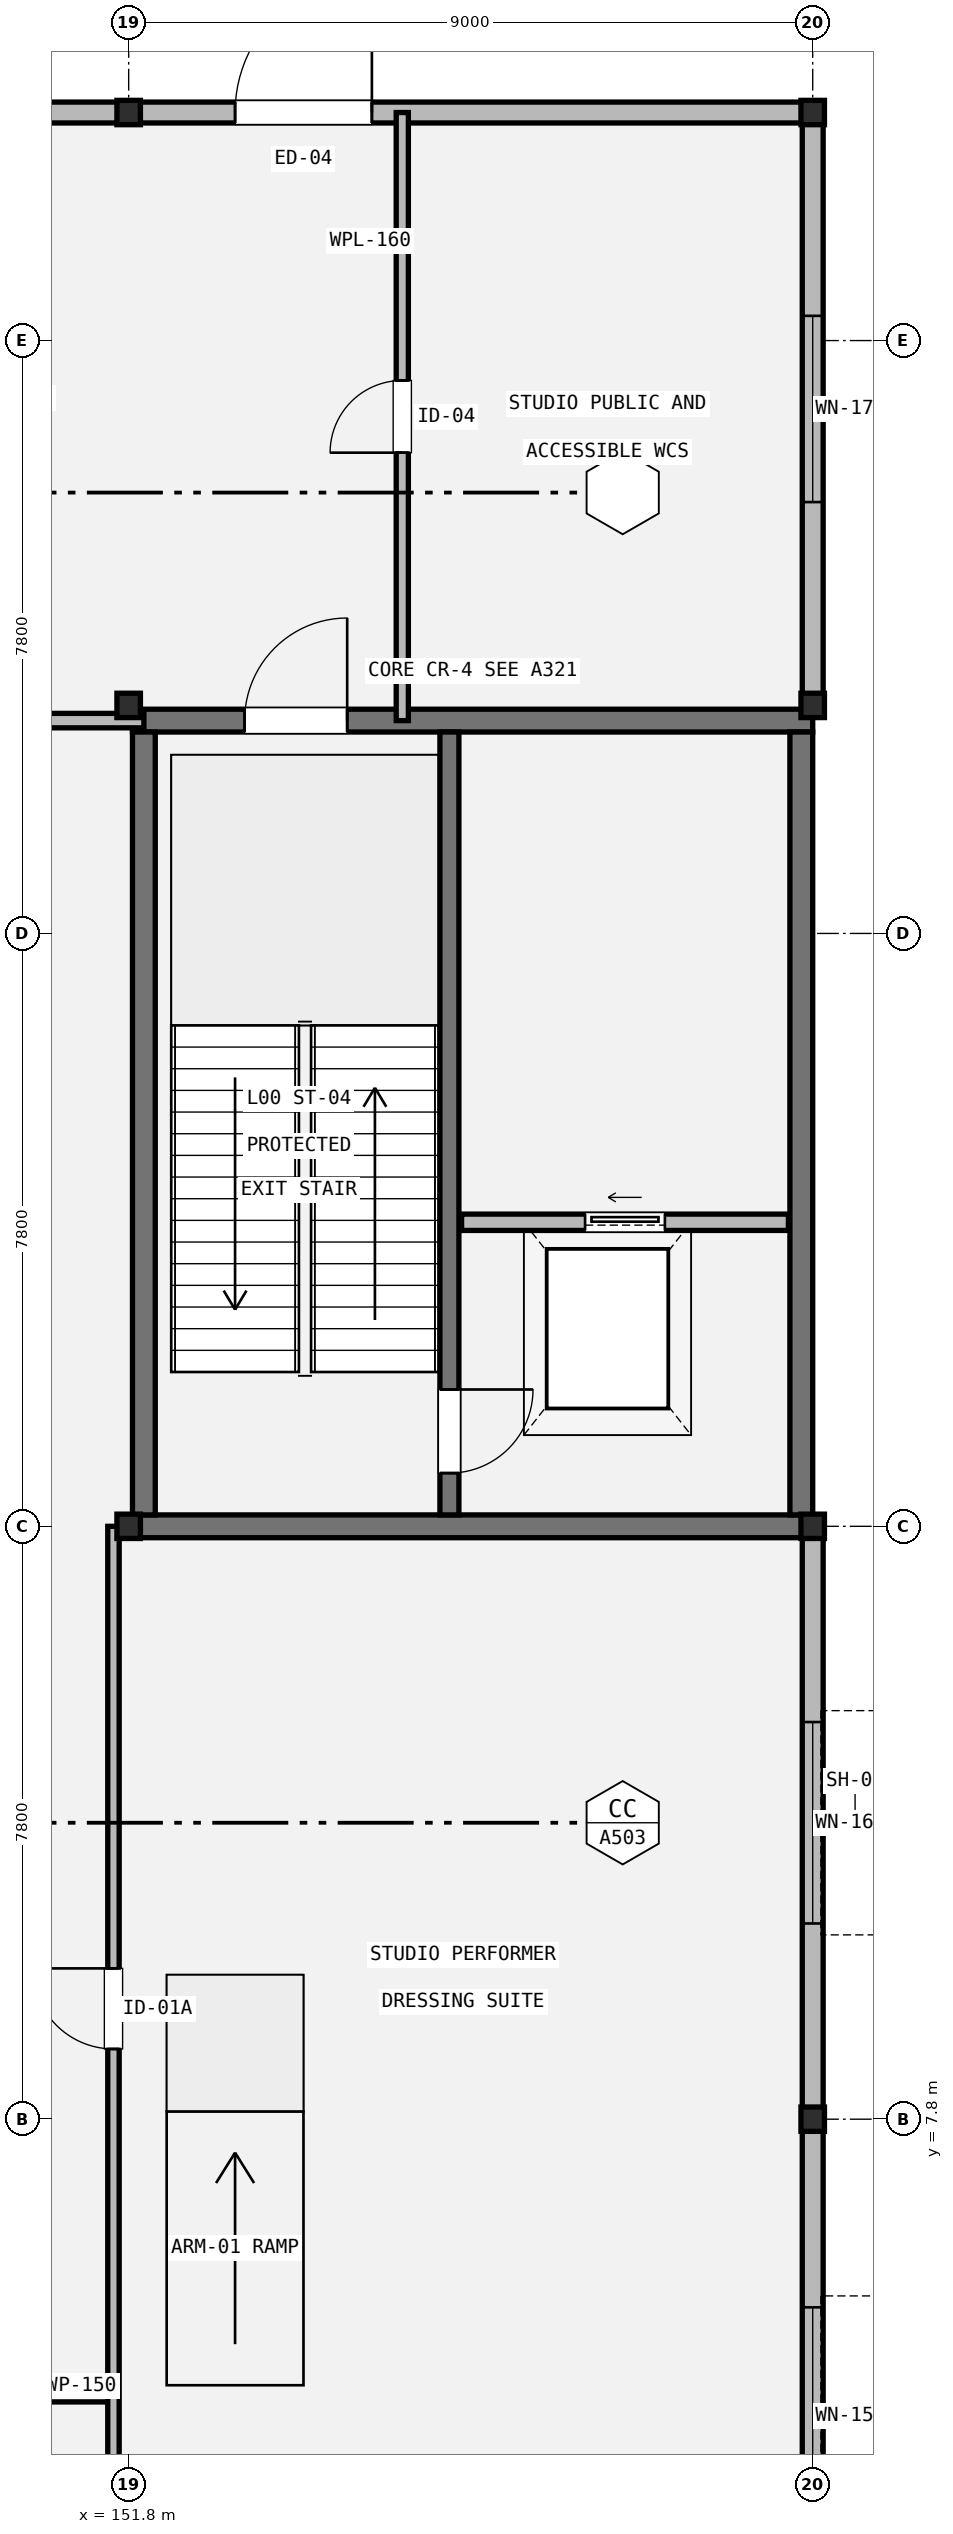
"""IFC4 building model, lengths in metres.
Left out: names, types, materials, properties, quantities, classifications, styles, units other than length and angle.
Written with IfcOpenShell. Run it as: python <this file> out.ifc"""

import sys

from ifc_helpers import new_model, si_unit, direction, frame, frame_2d, origin, origin_2d, place, context, subcontext, project, spatial, rectangle, i_section, extrude, element, fill, save


model = new_model("IFC4")
c1 = context("Model", 3, precision=1e-05, world=origin(), true_north=direction((0.0, 1.0)))
c2 = subcontext(c1, "Body", "Model", "MODEL_VIEW")
j1 = project(units=[si_unit("LENGTHUNIT", "METRE"), si_unit("PLANEANGLEUNIT", "RADIAN")], contexts=[c1])
p1 = place(None, origin())
s1 = spatial("IfcSite", under=j1, at=p1, CompositionType="ELEMENT")
p2 = place(p1, origin())
s2 = spatial("IfcBuilding", under=s1, at=p2, CompositionType="ELEMENT")
p3 = place(p2, origin())
s3 = spatial("IfcBuildingStorey", under=s2, at=p3, CompositionType="ELEMENT", Elevation=0.0)
for number, where, z_axis, x_axis in (
    (1, (151.8, 15.6, 0.0), (0.0, 0.0, 1.0), (1.0, 0.0, 0.0)),
    (2, (151.8, 26.4, 0.0), (0.0, 0.0, 1.0), (1.0, 0.0, 0.0)),
    (3, (151.8, 34.2, 0.0), (0.0, 0.0, 1.0), (1.0, 0.0, 0.0)),
    (4, (160.8, 7.8, 0.0), (0.0, 0.0, 1.0), (1.0, 0.0, 0.0)),
    (5, (160.8, 15.6, 0.0), (0.0, 0.0, 1.0), (1.0, 0.0, 0.0)),
    (6, (160.8, 26.4, 0.0), (0.0, 0.0, 1.0), (1.0, 0.0, 0.0)),
    (7, (160.8, 34.2, 0.0), (0.0, 0.0, 1.0), (1.0, 0.0, 0.0)),
):
    element("IfcColumn", number, at=place(p3, frame(where, z_axis=z_axis, x_axis=x_axis)), inside=s3, PredefinedType="COLUMN", context=c2, shape_type="SweptSolid", body=[
        extrude(i_section(OverallWidth=0.309, OverallDepth=0.321, WebThickness=0.014, FlangeThickness=0.022, FilletRadius=0.015, at=origin_2d()), origin(), (0.0, 0.0, 1.0), 5.4),
    ])
p4 = place(p3, frame((148.0, 34.2, 0.0), z_axis=(0.0, 0.0, 1.0), x_axis=(1.0, 0.0, 0.0)))
e8 = element("IfcWall", 8, at=p4, inside=s3, PredefinedType="STANDARD", context=c2, shape_type="SweptSolid", body=[
    extrude(rectangle(XDim=12.8, YDim=0.275, at=frame_2d((6.4, 0.0))), origin(), (0.0, 0.0, 1.0), 4.488),
])
p5 = place(p4, frame((5.2, 0.0, 0.0)))
e9 = element("IfcOpeningElement", 9, at=p5, cuts=e8, PredefinedType="OPENING", context=c2, shape_type="SweptSolid", body=[
    extrude(rectangle(XDim=1.8, YDim=2.4, at=frame_2d((0.9, 1.2))), frame((0.0, 0.147, 0.0), z_axis=(0.0, -1.0, 0.0), x_axis=(1.0, 0.0, 0.0)), (0.0, 0.0, 1.0), 0.295),
])
p6 = place(p3, frame((160.8, 34.2, 0.0), z_axis=(0.0, 0.0, 1.0), x_axis=(0.0, -1.0, 0.0)))
e10 = element("IfcWall", 10, at=p6, inside=s3, PredefinedType="STANDARD", context=c2, shape_type="SweptSolid", body=[
    extrude(rectangle(XDim=7.8, YDim=0.275, at=frame_2d((3.9, 0.0))), origin(), (0.0, 0.0, 1.0), 4.488),
])
p7 = place(p6, frame((2.675, 0.0, 0.9)))
e11 = element("IfcOpeningElement", 11, at=p7, cuts=e10, PredefinedType="OPENING", context=c2, shape_type="SweptSolid", body=[
    extrude(rectangle(XDim=2.45, YDim=2.1, at=frame_2d((1.225, 1.05))), frame((0.0, 0.147, 0.0), z_axis=(0.0, -1.0, 0.0), x_axis=(1.0, 0.0, 0.0)), (0.0, 0.0, 1.0), 0.295),
])
p8 = place(p3, frame((160.8, 15.6, 0.0), z_axis=(0.0, 0.0, 1.0), x_axis=(0.0, -1.0, 0.0)))
e12 = element("IfcWall", 12, at=p8, inside=s3, PredefinedType="STANDARD", context=c2, shape_type="SweptSolid", body=[
    extrude(rectangle(XDim=15.6, YDim=0.275, at=frame_2d((7.8, 0.0))), origin(), (0.0, 0.0, 1.0), 4.488),
])
p9 = place(p8, frame((2.575, 0.0, 0.9)))
e13 = element("IfcOpeningElement", 13, at=p9, cuts=e12, PredefinedType="OPENING", context=c2, shape_type="SweptSolid", body=[
    extrude(rectangle(XDim=2.65, YDim=2.1, at=frame_2d((1.325, 1.05))), frame((0.0, 0.147, 0.0), z_axis=(0.0, -1.0, 0.0), x_axis=(1.0, 0.0, 0.0)), (0.0, 0.0, 1.0), 0.295),
])
p10 = place(p8, frame((10.275, 0.0, 0.9)))
e14 = element("IfcOpeningElement", 14, at=p10, cuts=e12, PredefinedType="OPENING", context=c2, shape_type="SweptSolid", body=[
    extrude(rectangle(XDim=2.85, YDim=2.1, at=frame_2d((1.425, 1.05))), frame((0.0, 0.147, 0.0), z_axis=(0.0, -1.0, 0.0), x_axis=(1.0, 0.0, 0.0)), (0.0, 0.0, 1.0), 0.295),
])
p11 = place(p3, frame((160.8, 15.6, 0.0), z_axis=(0.0, 0.0, 1.0), x_axis=(-1.0, 0.0, 0.0)))
e15 = element("IfcWall", 15, at=p11, inside=s3, PredefinedType="SHEAR", context=c2, shape_type="SweptSolid", body=[
    extrude(rectangle(XDim=8.95, YDim=0.3, at=frame_2d((4.475, 0.0))), origin(), (0.0, 0.0, 1.0), 5.18),
])
p12 = place(p3, frame((151.85, 26.2, 0.0), z_axis=(0.0, 0.0, 1.0), x_axis=(1.0, 0.0, 0.0)))
e16 = element("IfcWall", 16, at=p12, inside=s3, PredefinedType="SHEAR", context=c2, shape_type="SweptSolid", body=[
    extrude(rectangle(XDim=8.95, YDim=0.3, at=frame_2d((4.475, 0.0))), origin(), (0.0, 0.0, 1.0), 5.18),
])
p13 = place(p12, frame((1.475, 0.0, 0.0)))
e17 = element("IfcOpeningElement", 17, at=p13, cuts=e16, PredefinedType="OPENING", context=c2, shape_type="SweptSolid", body=[
    extrude(rectangle(XDim=1.35, YDim=2.15, at=frame_2d((0.675, 1.075))), frame((0.0, 0.16, 0.0), z_axis=(0.0, -1.0, 0.0), x_axis=(1.0, 0.0, 0.0)), (0.0, 0.0, 1.0), 0.32),
])
for number, where, z_axis, x_axis in (
    (18, (152.0, 15.75, 0.0), (0.0, 0.0, 1.0), (0.0, 1.0, 0.0)),
    (19, (160.65, 26.05, 0.0), (0.0, 0.0, 1.0), (0.0, -1.0, 0.0)),
):
    element("IfcWall", number, at=place(p3, frame(where, z_axis=z_axis, x_axis=x_axis)), inside=s3, PredefinedType="SHEAR", context=c2, shape_type="SweptSolid", body=[
        extrude(rectangle(XDim=10.3, YDim=0.3, at=frame_2d((5.15, 0.0))), origin(), (0.0, 0.0, 1.0), 5.18),
    ])
p14 = place(p3, frame((156.02, 26.05, 0.0), z_axis=(0.0, 0.0, 1.0), x_axis=(0.0, -1.0, 0.0)))
e20 = element("IfcWall", 20, at=p14, inside=s3, PredefinedType="SHEAR", context=c2, shape_type="SweptSolid", body=[
    extrude(rectangle(XDim=10.3, YDim=0.25, at=frame_2d((5.15, 0.0))), origin(), (0.0, 0.0, 1.0), 5.18),
])
p15 = place(p14, frame((8.65, 0.0, 0.0)))
e21 = element("IfcOpeningElement", 21, at=p15, cuts=e20, PredefinedType="OPENING", context=c2, shape_type="SweptSolid", body=[
    extrude(rectangle(XDim=1.1, YDim=2.15, at=frame_2d((0.55, 1.075))), frame((0.0, 0.135, 0.0), z_axis=(0.0, -1.0, 0.0), x_axis=(1.0, 0.0, 0.0)), (0.0, 0.0, 1.0), 0.27),
])
p16 = place(p3, frame((156.18, 19.6, 0.0), z_axis=(0.0, 0.0, 1.0), x_axis=(1.0, 0.0, 0.0)))
e22 = element("IfcWall", 22, at=p16, inside=s3, PredefinedType="STANDARD", context=c2, shape_type="SweptSolid", body=[
    extrude(rectangle(XDim=4.3, YDim=0.215, at=frame_2d((2.15, 0.0))), origin(), (0.0, 0.0, 1.0), 5.172),
])
p17 = place(p16, frame((1.625, 0.0, 0.0)))
e23 = element("IfcOpeningElement", 23, at=p17, cuts=e22, PredefinedType="OPENING", context=c2, shape_type="SweptSolid", body=[
    extrude(rectangle(XDim=1.05, YDim=2.15, at=frame_2d((0.525, 1.075))), frame((0.0, 0.117, 0.0), z_axis=(0.0, -1.0, 0.0), x_axis=(1.0, 0.0, 0.0)), (0.0, 0.0, 1.0), 0.235),
])
p18 = place(p3, frame((131.0, 4.2, 0.0), z_axis=(0.0, 0.0, 1.0), x_axis=(1.0, 0.0, 0.0)))
e24 = element("IfcWall", 24, at=p18, inside=s3, PredefinedType="PARTITIONING", context=c2, shape_type="SweptSolid", body=[
    extrude(rectangle(XDim=20.6, YDim=0.24, at=frame_2d((10.3, 0.0))), origin(), (0.0, 0.0, 1.0), 4.402),
])
p19 = place(p18, frame((9.425, 0.0, 0.0)))
e25 = element("IfcOpeningElement", 25, at=p19, cuts=e24, PredefinedType="OPENING", context=c2, shape_type="SweptSolid", body=[
    extrude(rectangle(XDim=1.75, YDim=2.3, at=frame_2d((0.875, 1.15))), frame((0.0, 0.13, 0.0), z_axis=(0.0, -1.0, 0.0), x_axis=(1.0, 0.0, 0.0)), (0.0, 0.0, 1.0), 0.26),
])
p20 = place(p3, frame((134.4, 26.2, 0.0), z_axis=(0.0, 0.0, 1.0), x_axis=(1.0, 0.0, 0.0)))
e26 = element("IfcWall", 26, at=p20, inside=s3, PredefinedType="PARTITIONING", context=c2, shape_type="SweptSolid", body=[
    extrude(rectangle(XDim=17.6, YDim=0.19, at=frame_2d((8.8, 0.0))), origin(), (0.0, 0.0, 1.0), 4.488),
])
p21 = place(p20, frame((9.827, 0.0, 0.0)))
e27 = element("IfcOpeningElement", 27, at=p21, cuts=e26, PredefinedType="OPENING", context=c2, shape_type="SweptSolid", body=[
    extrude(rectangle(XDim=1.75, YDim=2.3, at=frame_2d((0.875, 1.15))), frame((0.0, 0.105, 0.0), z_axis=(0.0, -1.0, 0.0), x_axis=(1.0, 0.0, 0.0)), (0.0, 0.0, 1.0), 0.21),
])
p22 = place(p3, frame((151.6, 0.0, 0.0), z_axis=(0.0, 0.0, 1.0), x_axis=(0.0, 1.0, 0.0)))
e28 = element("IfcWall", 28, at=p22, inside=s3, PredefinedType="PARTITIONING", context=c2, shape_type="SweptSolid", body=[
    extrude(rectangle(XDim=15.6, YDim=0.15, at=frame_2d((7.8, 0.0))), origin(), (0.0, 0.0, 1.0), 4.402),
])
p23 = place(p22, frame((8.724, 0.0, 0.0)))
e29 = element("IfcOpeningElement", 29, at=p23, cuts=e28, PredefinedType="OPENING", context=c2, shape_type="SweptSolid", body=[
    extrude(rectangle(XDim=1.06, YDim=2.1, at=frame_2d((0.53, 1.05))), frame((0.0, 0.085, 0.0), z_axis=(0.0, -1.0, 0.0), x_axis=(1.0, 0.0, 0.0)), (0.0, 0.0, 1.0), 0.17),
])
p24 = place(p3, frame((155.4, 26.2, 0.0), z_axis=(0.0, 0.0, 1.0), x_axis=(0.0, 1.0, 0.0)))
e30 = element("IfcWall", 30, at=p24, inside=s3, PredefinedType="PLUMBINGWALL", context=c2, shape_type="SweptSolid", body=[
    extrude(rectangle(XDim=8.0, YDim=0.16, at=frame_2d((4.0, 0.0))), origin(), (0.0, 0.0, 1.0), 4.488),
])
p25 = place(p24, frame((3.525, 0.0, 0.0)))
e31 = element("IfcOpeningElement", 31, at=p25, cuts=e30, PredefinedType="OPENING", context=c2, shape_type="SweptSolid", body=[
    extrude(rectangle(XDim=0.95, YDim=2.1, at=frame_2d((0.475, 1.05))), frame((0.0, 0.09, 0.0), z_axis=(0.0, -1.0, 0.0), x_axis=(1.0, 0.0, 0.0)), (0.0, 0.0, 1.0), 0.18),
])
p26 = place(p5, origin())
e32 = element("IfcDoor", 32, at=p26, inside=s3, OperationType="SINGLE_SWING_RIGHT", PredefinedType="DOOR", context=c2, shape_type="SweptSolid", body=[
    extrude(rectangle(XDim=1.8, YDim=2.4, at=frame_2d((0.9, 1.2))), frame((0.0, 0.025, 0.0), z_axis=(0.0, -1.0, 0.0), x_axis=(1.0, 0.0, 0.0)), (0.0, 0.0, 1.0), 0.05),
])
fill(e9, e32)
p27 = place(p7, origin())
e33 = element("IfcWindow", 33, at=p27, inside=s3, PartitioningType="SINGLE_PANEL", PredefinedType="WINDOW", context=c2, shape_type="SweptSolid", body=[
    extrude(rectangle(XDim=2.45, YDim=2.1, at=frame_2d((1.225, 1.05))), frame((0.0, 0.03, 0.0), z_axis=(0.0, -1.0, 0.0), x_axis=(1.0, 0.0, 0.0)), (0.0, 0.0, 1.0), 0.06),
])
fill(e11, e33)
p28 = place(p9, origin())
e34 = element("IfcWindow", 34, at=p28, inside=s3, PartitioningType="SINGLE_PANEL", PredefinedType="WINDOW", context=c2, shape_type="SweptSolid", body=[
    extrude(rectangle(XDim=2.65, YDim=2.1, at=frame_2d((1.325, 1.05))), frame((0.0, 0.03, 0.0), z_axis=(0.0, -1.0, 0.0), x_axis=(1.0, 0.0, 0.0)), (0.0, 0.0, 1.0), 0.06),
])
fill(e13, e34)
p29 = place(p10, origin())
e35 = element("IfcWindow", 35, at=p29, inside=s3, PartitioningType="SINGLE_PANEL", PredefinedType="WINDOW", context=c2, shape_type="SweptSolid", body=[
    extrude(rectangle(XDim=2.85, YDim=2.1, at=frame_2d((1.425, 1.05))), frame((0.0, 0.03, 0.0), z_axis=(0.0, -1.0, 0.0), x_axis=(1.0, 0.0, 0.0)), (0.0, 0.0, 1.0), 0.06),
])
fill(e14, e35)
p30 = place(p15, origin())
e36 = element("IfcDoor", 36, at=p30, inside=s3, OperationType="SINGLE_SWING_LEFT", PredefinedType="DOOR", context=c2, shape_type="SweptSolid", body=[
    extrude(rectangle(XDim=1.1, YDim=2.15, at=frame_2d((0.55, 1.075))), frame((0.0, 0.025, 0.0), z_axis=(0.0, -1.0, 0.0), x_axis=(1.0, 0.0, 0.0)), (0.0, 0.0, 1.0), 0.05),
])
fill(e21, e36)
p31 = place(p13, origin())
e37 = element("IfcDoor", 37, at=p31, inside=s3, OperationType="SINGLE_SWING_RIGHT", PredefinedType="DOOR", context=c2, shape_type="SweptSolid", body=[
    extrude(rectangle(XDim=1.35, YDim=2.15, at=frame_2d((0.675, 1.075))), frame((0.0, 0.025, 0.0), z_axis=(0.0, -1.0, 0.0), x_axis=(1.0, 0.0, 0.0)), (0.0, 0.0, 1.0), 0.05),
])
fill(e17, e37)
p32 = place(p17, origin())
e38 = element("IfcDoor", 38, at=p32, inside=s3, OperationType="SLIDING_TO_LEFT", PredefinedType="DOOR", context=c2, shape_type="SweptSolid", body=[
    extrude(rectangle(XDim=1.05, YDim=2.15, at=frame_2d((0.525, 1.075))), frame((0.0, 0.025, 0.0), z_axis=(0.0, -1.0, 0.0), x_axis=(1.0, 0.0, 0.0)), (0.0, 0.0, 1.0), 0.05),
])
fill(e23, e38)
p33 = place(p23, origin())
e39 = element("IfcDoor", 39, at=p33, inside=s3, OperationType="SINGLE_SWING_RIGHT", PredefinedType="DOOR", context=c2, shape_type="SweptSolid", body=[
    extrude(rectangle(XDim=1.06, YDim=2.1, at=frame_2d((0.53, 1.05))), frame((0.0, 0.025, 0.0), z_axis=(0.0, -1.0, 0.0), x_axis=(1.0, 0.0, 0.0)), (0.0, 0.0, 1.0), 0.05),
])
fill(e29, e39)
p34 = place(p25, origin())
e40 = element("IfcDoor", 40, at=p34, inside=s3, OperationType="SINGLE_SWING_LEFT", PredefinedType="DOOR", context=c2, shape_type="SweptSolid", body=[
    extrude(rectangle(XDim=0.95, YDim=2.1, at=frame_2d((0.475, 1.05))), frame((0.0, 0.025, 0.0), z_axis=(0.0, -1.0, 0.0), x_axis=(1.0, 0.0, 0.0)), (0.0, 0.0, 1.0), 0.05),
])
fill(e31, e40)
save(model, sys.argv[1])
